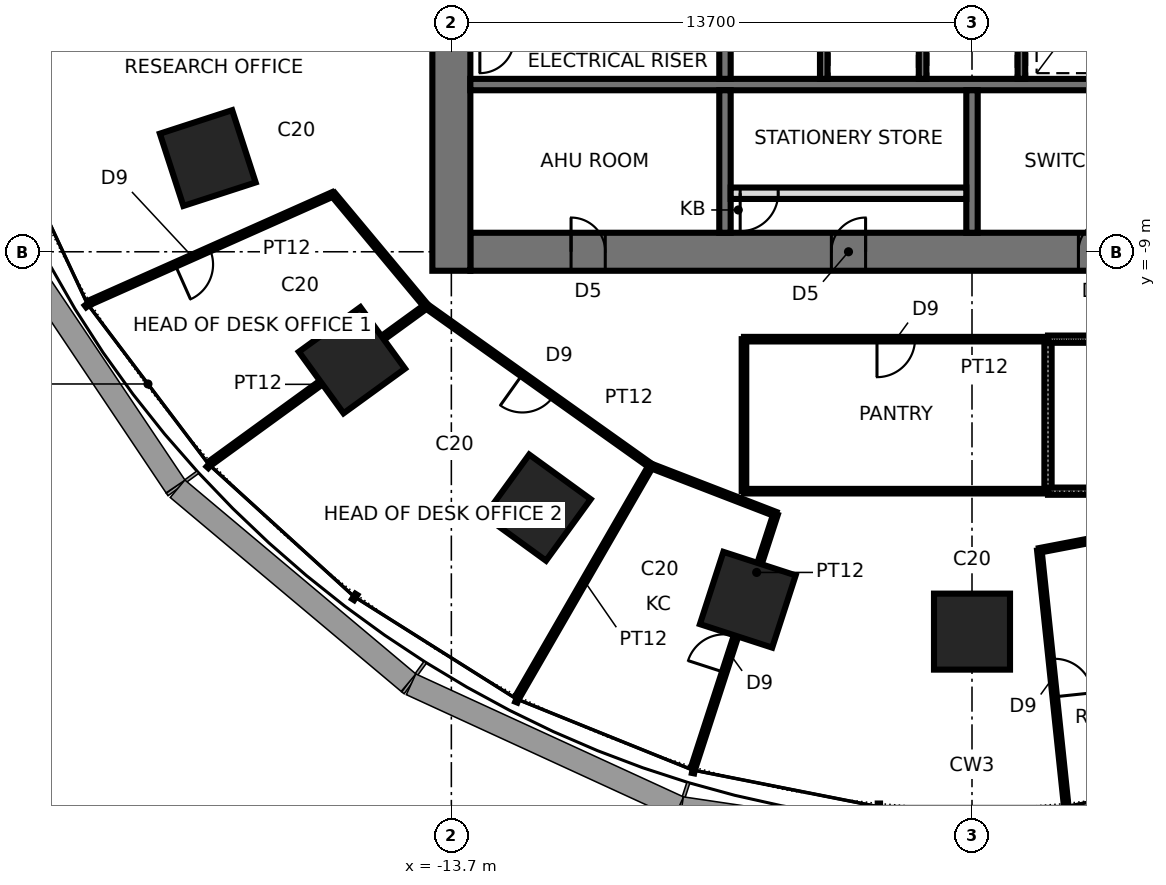
"""IFC4 building model, lengths in metres.
Left out: names, types, materials, properties, quantities, classifications, styles, units other than length and angle.
Written with IfcOpenShell. Run it as: python <this file> out.ifc"""

import sys

from ifc_helpers import new_model, si_unit, direction, frame, frame_2d, origin, origin_2d, place, context, subcontext, project, spatial, rectangle, extrude, element, fill, save


model = new_model("IFC4")
c1 = context("Model", 3, precision=1e-05, world=origin(), true_north=direction((0.0, 1.0)))
c2 = subcontext(c1, "Body", "Model", "MODEL_VIEW")
j1 = project(units=[si_unit("LENGTHUNIT", "METRE"), si_unit("PLANEANGLEUNIT", "RADIAN")], contexts=[c1])
p1 = place(None, origin())
s1 = spatial("IfcSite", under=j1, at=p1, CompositionType="ELEMENT")
p2 = place(p1, origin())
s2 = spatial("IfcBuilding", under=s1, at=p2, CompositionType="ELEMENT")
p3 = place(p2, frame((0.0, 0.0, 57.4)))
s3 = spatial("IfcBuildingStorey", under=s2, at=p3, CompositionType="ELEMENT", Elevation=57.4)
for number, where, z_axis, x_axis in (
    (1, (-20.109, -6.534, 0.0), (0.0, 0.0, 1.0), (-0.951, -0.309, 0.0)),
    (2, (-16.315, -11.854, 0.0), (0.0, 0.0, 1.0), (-0.809, -0.588, 0.0)),
    (3, (-11.43, -15.733, 0.0), (0.0, 0.0, 1.0), (-0.588, -0.809, 0.0)),
    (4, (-5.9, -18.157, 0.0), (0.0, 0.0, 1.0), (-0.309, -0.951, 0.0)),
    (5, (0.0, -18.996, 0.0), (0.0, 0.0, 1.0), (0.0, -1.0, 0.0)),
):
    element("IfcColumn", number, at=place(p3, frame(where, z_axis=z_axis, x_axis=x_axis)), inside=s3, PredefinedType="COLUMN", context=c2, shape_type="SweptSolid", body=[
        extrude(rectangle(XDim=2.0, YDim=2.0, at=origin_2d()), origin(), (0.0, 0.0, 1.0), 4.2),
    ])
p4 = place(p3, frame((-13.2, -9.0, 0.0), z_axis=(0.0, 0.0, 1.0), x_axis=(1.0, 0.0, 0.0)))
e6 = element("IfcWall", 6, at=p4, inside=s3, PredefinedType="SHEAR", context=c2, shape_type="SweptSolid", body=[
    extrude(rectangle(XDim=26.4, YDim=1.0, at=frame_2d((13.2, 0.0))), origin(), (0.0, 0.0, 1.0), 4.2),
])
p5 = place(p4, frame((2.65, 0.0, 0.0)))
e7 = element("IfcOpeningElement", 7, at=p5, cuts=e6, PredefinedType="OPENING", context=c2, shape_type="SweptSolid", body=[
    extrude(rectangle(XDim=0.9, YDim=2.1, at=frame_2d((0.45, 1.05))), frame((0.0, 0.51, 0.0), z_axis=(0.0, -1.0, 0.0), x_axis=(1.0, 0.0, 0.0)), (0.0, 0.0, 1.0), 1.02),
])
p6 = place(p4, frame((9.5, 0.0, 0.0)))
e8 = element("IfcOpeningElement", 8, at=p6, cuts=e6, PredefinedType="OPENING", context=c2, shape_type="SweptSolid", body=[
    extrude(rectangle(XDim=0.9, YDim=2.1, at=frame_2d((0.45, 1.05))), frame((0.0, 0.51, 0.0), z_axis=(0.0, -1.0, 0.0), x_axis=(1.0, 0.0, 0.0)), (0.0, 0.0, 1.0), 1.02),
])
p7 = place(p4, frame((16.0, 0.0, 0.0)))
e9 = element("IfcOpeningElement", 9, at=p7, cuts=e6, PredefinedType="OPENING", context=c2, shape_type="SweptSolid", body=[
    extrude(rectangle(XDim=0.9, YDim=2.1, at=frame_2d((0.45, 1.05))), frame((0.0, 0.51, 0.0), z_axis=(0.0, -1.0, 0.0), x_axis=(1.0, 0.0, 0.0)), (0.0, 0.0, 1.0), 1.02),
])
p8 = place(p4, frame((22.85, 0.0, 0.0)))
e10 = element("IfcOpeningElement", 10, at=p8, cuts=e6, PredefinedType="OPENING", context=c2, shape_type="SweptSolid", body=[
    extrude(rectangle(XDim=0.9, YDim=2.1, at=frame_2d((0.45, 1.05))), frame((0.0, 0.51, 0.0), z_axis=(0.0, -1.0, 0.0), x_axis=(1.0, 0.0, 0.0)), (0.0, 0.0, 1.0), 1.02),
])
p9 = place(p3, frame((-13.7, 9.5, 0.0), z_axis=(0.0, 0.0, 1.0), x_axis=(0.0, -1.0, 0.0)))
e11 = element("IfcWall", 11, at=p9, inside=s3, PredefinedType="SHEAR", context=c2, shape_type="SweptSolid", body=[
    extrude(rectangle(XDim=19.0, YDim=1.0, at=frame_2d((9.5, 0.0))), origin(), (0.0, 0.0, 1.0), 4.2),
])
p10 = place(p9, frame((8.6, 0.0, 0.0)))
e12 = element("IfcOpeningElement", 12, at=p10, cuts=e11, PredefinedType="OPENING", context=c2, shape_type="SweptSolid", body=[
    extrude(rectangle(XDim=1.8, YDim=2.4, at=frame_2d((0.9, 1.2))), frame((0.0, 0.51, 0.0), z_axis=(0.0, -1.0, 0.0), x_axis=(1.0, 0.0, 0.0)), (0.0, 0.0, 1.0), 1.02),
])
p11 = place(p3, frame((-13.2, -4.6, 0.0), z_axis=(0.0, 0.0, 1.0), x_axis=(1.0, 0.0, 0.0)))
e13 = element("IfcWall", 13, at=p11, inside=s3, PredefinedType="SHEAR", context=c2, shape_type="SweptSolid", body=[
    extrude(rectangle(XDim=26.4, YDim=0.3, at=frame_2d((13.2, 0.0))), origin(), (0.0, 0.0, 1.0), 4.2),
])
p12 = place(p3, frame((-6.5, -1.75, 0.0), z_axis=(0.0, 0.0, 1.0), x_axis=(0.0, -1.0, 0.0)))
e14 = element("IfcWall", 14, at=p12, inside=s3, PredefinedType="SHEAR", context=c2, shape_type="SweptSolid", body=[
    extrude(rectangle(XDim=2.7, YDim=0.3, at=frame_2d((1.35, 0.0))), origin(), (0.0, 0.0, 1.0), 4.2),
])
p13 = place(p3, frame((-6.5, -4.75, 0.0), z_axis=(0.0, 0.0, 1.0), x_axis=(0.0, -1.0, 0.0)))
e15 = element("IfcWall", 15, at=p13, inside=s3, PredefinedType="SHEAR", context=c2, shape_type="SweptSolid", body=[
    extrude(rectangle(XDim=3.75, YDim=0.3, at=frame_2d((1.875, 0.0))), origin(), (0.0, 0.0, 1.0), 4.2),
])
for number, where, z_axis, x_axis in (
    (16, (-3.9, -1.75, 0.0), (0.0, 0.0, 1.0), (0.0, -1.0, 0.0)),
    (17, (-1.3, -1.75, 0.0), (0.0, 0.0, 1.0), (0.0, -1.0, 0.0)),
    (18, (1.3, -1.75, 0.0), (0.0, 0.0, 1.0), (0.0, -1.0, 0.0)),
):
    element("IfcWall", number, at=place(p3, frame(where, z_axis=z_axis, x_axis=x_axis)), inside=s3, PredefinedType="SHEAR", context=c2, shape_type="SweptSolid", body=[
        extrude(rectangle(XDim=2.7, YDim=0.2, at=frame_2d((1.35, 0.0))), origin(), (0.0, 0.0, 1.0), 4.2),
    ])
p14 = place(p3, frame((0.0, -4.75, 0.0), z_axis=(0.0, 0.0, 1.0), x_axis=(0.0, -1.0, 0.0)))
e19 = element("IfcWall", 19, at=p14, inside=s3, PredefinedType="SHEAR", context=c2, shape_type="SweptSolid", body=[
    extrude(rectangle(XDim=3.75, YDim=0.3, at=frame_2d((1.875, 0.0))), origin(), (0.0, 0.0, 1.0), 4.2),
])
p15 = place(p3, frame((-6.35, -7.46, 0.0), z_axis=(0.0, 0.0, 1.0), x_axis=(1.0, 0.0, 0.0)))
e20 = element("IfcWall", 20, at=p15, inside=s3, PredefinedType="PARTITIONING", context=c2, shape_type="SweptSolid", body=[
    extrude(rectangle(XDim=6.2, YDim=0.3, at=frame_2d((3.1, 0.0))), origin(), (0.0, 0.0, 1.0), 4.04),
])
p16 = place(p15, frame((0.25, 0.0, 0.0)))
e21 = element("IfcOpeningElement", 21, at=p16, cuts=e20, PredefinedType="OPENING", context=c2, shape_type="SweptSolid", body=[
    extrude(rectangle(XDim=1.0, YDim=2.4, at=frame_2d((0.5, 1.2))), frame((0.0, 0.16, 0.0), z_axis=(0.0, -1.0, 0.0), x_axis=(1.0, 0.0, 0.0)), (0.0, 0.0, 1.0), 0.32),
])
p17 = place(p3, frame((-16.813, -7.486, 0.0), z_axis=(0.0, 0.0, 1.0), x_axis=(-0.913543837108, -0.406740282837, 0.0)))
e22 = element("IfcWall", 22, at=p17, inside=s3, PredefinedType="PARTITIONING", context=c2, shape_type="SweptSolid", body=[
    extrude(rectangle(XDim=7.0, YDim=0.12, at=frame_2d((3.5, 0.0))), origin(), (0.0, 0.0, 1.0), 4.04),
])
p18 = place(p17, frame((3.55, 0.0, 0.0)))
e23 = element("IfcOpeningElement", 23, at=p18, cuts=e22, PredefinedType="OPENING", context=c2, shape_type="SweptSolid", body=[
    extrude(rectangle(XDim=1.0, YDim=2.4, at=frame_2d((0.5, 1.2))), frame((0.0, 0.07, 0.0), z_axis=(0.0, -1.0, 0.0), x_axis=(1.0, 0.0, 0.0)), (0.0, 0.0, 1.0), 0.14),
])
p19 = place(p3, frame((-14.358, -10.431, 0.0), z_axis=(0.0, 0.0, 1.0), x_axis=(-0.640365972165, 0.768069932814, 0.0)))
e24 = element("IfcWall", 24, at=p19, inside=s3, PredefinedType="PARTITIONING", context=c2, shape_type="SweptSolid", body=[
    extrude(rectangle(XDim=3.835, YDim=0.12, at=frame_2d((1.917, 0.0))), origin(), (0.0, 0.0, 1.0), 4.04),
])
p20 = place(p3, frame((-14.358, -10.431, 0.0), z_axis=(0.0, 0.0, 1.0), x_axis=(-0.809015012105, -0.587787980643, 0.0)))
e25 = element("IfcWall", 25, at=p20, inside=s3, PredefinedType="PARTITIONING", context=c2, shape_type="SweptSolid", body=[
    extrude(rectangle(XDim=7.0, YDim=0.12, at=frame_2d((3.5, 0.0))), origin(), (0.0, 0.0, 1.0), 2.84),
])
p21 = place(p3, frame((-8.449, -14.635, 0.0), z_axis=(0.0, 0.0, 1.0), x_axis=(-0.814853539304, 0.57966689528, 0.0)))
e26 = element("IfcWall", 26, at=p21, inside=s3, PredefinedType="PARTITIONING", context=c2, shape_type="SweptSolid", body=[
    extrude(rectangle(XDim=7.251, YDim=0.12, at=frame_2d((3.625, 0.0))), origin(), (0.0, 0.0, 1.0), 4.04),
])
p22 = place(p21, frame((3.15, 0.0, 0.0)))
e27 = element("IfcOpeningElement", 27, at=p22, cuts=e26, PredefinedType="OPENING", context=c2, shape_type="SweptSolid", body=[
    extrude(rectangle(XDim=1.0, YDim=2.4, at=frame_2d((0.5, 1.2))), frame((0.0, 0.07, 0.0), z_axis=(0.0, -1.0, 0.0), x_axis=(1.0, 0.0, 0.0)), (0.0, 0.0, 1.0), 0.14),
])
p23 = place(p3, frame((-8.449, -14.635, 0.0), z_axis=(0.0, 0.0, 1.0), x_axis=(-0.499995173006, -0.866028190633, 0.0)))
e28 = element("IfcWall", 28, at=p23, inside=s3, PredefinedType="PARTITIONING", context=c2, shape_type="SweptSolid", body=[
    extrude(rectangle(XDim=7.0, YDim=0.12, at=frame_2d((3.5, 0.0))), origin(), (0.0, 0.0, 1.0), 4.04),
])
p24 = place(p3, frame((-6.0, -11.3, 0.0), z_axis=(0.0, 0.0, 1.0), x_axis=(0.0, -1.0, 0.0)))
e29 = element("IfcWall", 29, at=p24, inside=s3, PredefinedType="PARTITIONING", context=c2, shape_type="SweptSolid", body=[
    extrude(rectangle(XDim=4.0, YDim=0.12, at=frame_2d((2.0, 0.0))), origin(), (0.0, 0.0, 1.0), 4.04),
])
p25 = place(p3, frame((-5.167, -15.903, 0.0), z_axis=(0.0, 0.0, 1.0), x_axis=(-0.932804495801, 0.360382813983, 0.0)))
e30 = element("IfcWall", 30, at=p25, inside=s3, PredefinedType="PARTITIONING", context=c2, shape_type="SweptSolid", body=[
    extrude(rectangle(XDim=3.519, YDim=0.12, at=frame_2d((1.759, 0.0))), origin(), (0.0, 0.0, 1.0), 4.04),
])
p26 = place(p3, frame((-7.33, -22.56, 0.0), z_axis=(0.0, 0.0, 1.0), x_axis=(0.309009574742, 0.951058927048, 0.0)))
e31 = element("IfcWall", 31, at=p26, inside=s3, PredefinedType="PARTITIONING", context=c2, shape_type="SweptSolid", body=[
    extrude(rectangle(XDim=7.0, YDim=0.12, at=frame_2d((3.5, 0.0))), origin(), (0.0, 0.0, 1.0), 2.84),
])
p27 = place(p26, frame((2.621, 0.0, 0.0)))
e32 = element("IfcOpeningElement", 32, at=p27, cuts=e31, PredefinedType="OPENING", context=c2, shape_type="SweptSolid", body=[
    extrude(rectangle(XDim=1.0, YDim=2.4, at=frame_2d((0.5, 1.2))), frame((0.0, 0.07, 0.0), z_axis=(0.0, -1.0, 0.0), x_axis=(1.0, 0.0, 0.0)), (0.0, 0.0, 1.0), 0.14),
])
p28 = place(p3, frame((2.0, -11.3, 0.0), z_axis=(0.0, 0.0, 1.0), x_axis=(-1.0, 0.0, 0.0)))
e33 = element("IfcWall", 33, at=p28, inside=s3, PredefinedType="PARTITIONING", context=c2, shape_type="SweptSolid", body=[
    extrude(rectangle(XDim=8.0, YDim=0.12, at=frame_2d((4.0, 0.0))), origin(), (0.0, 0.0, 1.0), 4.04),
])
p29 = place(p28, frame((3.5, 0.0, 0.0)))
e34 = element("IfcOpeningElement", 34, at=p29, cuts=e33, PredefinedType="OPENING", context=c2, shape_type="SweptSolid", body=[
    extrude(rectangle(XDim=1.0, YDim=2.4, at=frame_2d((0.5, 1.2))), frame((0.0, 0.07, 0.0), z_axis=(0.0, -1.0, 0.0), x_axis=(1.0, 0.0, 0.0)), (0.0, 0.0, 1.0), 0.14),
])
p30 = place(p3, frame((-6.0, -15.3, 0.0), z_axis=(0.0, 0.0, 1.0), x_axis=(1.0, 0.0, 0.0)))
e35 = element("IfcWall", 35, at=p30, inside=s3, PredefinedType="PARTITIONING", context=c2, shape_type="SweptSolid", body=[
    extrude(rectangle(XDim=8.0, YDim=0.12, at=frame_2d((4.0, 0.0))), origin(), (0.0, 0.0, 1.0), 3.586),
])
p31 = place(p3, frame((1.772, -16.857, 0.0), z_axis=(0.0, 0.0, 1.0), x_axis=(0.104542522915, -0.994520417539, 0.0)))
e36 = element("IfcWall", 36, at=p31, inside=s3, PredefinedType="PARTITIONING", context=c2, shape_type="SweptSolid", body=[
    extrude(rectangle(XDim=6.7, YDim=0.12, at=frame_2d((3.35, 0.0))), origin(), (0.0, 0.0, 1.0), 4.04),
])
p32 = place(p31, frame((2.875, 0.0, 0.0)))
e37 = element("IfcOpeningElement", 37, at=p32, cuts=e36, PredefinedType="OPENING", context=c2, shape_type="SweptSolid", body=[
    extrude(rectangle(XDim=1.0, YDim=2.4, at=frame_2d((0.5, 1.2))), frame((0.0, 0.07, 0.0), z_axis=(0.0, -1.0, 0.0), x_axis=(1.0, 0.0, 0.0)), (0.0, 0.0, 1.0), 0.14),
])
p33 = place(p3, frame((2.0, -11.3, 0.0), z_axis=(0.0, 0.0, 1.0), x_axis=(0.0, -1.0, 0.0)))
e38 = element("IfcWall", 38, at=p33, inside=s3, PredefinedType="SOLIDWALL", context=c2, shape_type="SweptSolid", body=[
    extrude(rectangle(XDim=4.0, YDim=0.19, at=frame_2d((2.0, 0.0))), origin(), (0.0, 0.0, 1.0), 4.04),
])
p34 = place(p3, frame((5.26, -16.188, 0.0), z_axis=(0.0, 0.0, 1.0), x_axis=(-0.982089213151, -0.188416499842, 0.0)))
e39 = element("IfcWall", 39, at=p34, inside=s3, PredefinedType="PARTITIONING", context=c2, shape_type="SweptSolid", body=[
    extrude(rectangle(XDim=3.552, YDim=0.12, at=frame_2d((1.776, 0.0))), origin(), (0.0, 0.0, 1.0), 4.04),
])
p35 = place(p3, frame((2.0, -15.3, 0.0), z_axis=(0.0, 0.0, 1.0), x_axis=(1.0, 0.0, 0.0)))
e40 = element("IfcWall", 40, at=p35, inside=s3, PredefinedType="SOLIDWALL", context=c2, shape_type="SweptSolid", body=[
    extrude(rectangle(XDim=6.0, YDim=0.19, at=frame_2d((3.0, 0.0))), origin(), (0.0, 0.0, 1.0), 3.586),
])
p36 = place(p3, frame((8.0, -11.3, 0.0), z_axis=(0.0, 0.0, 1.0), x_axis=(-1.0, 0.0, 0.0)))
e41 = element("IfcWall", 41, at=p36, inside=s3, PredefinedType="SOLIDWALL", context=c2, shape_type="SweptSolid", body=[
    extrude(rectangle(XDim=6.0, YDim=0.19, at=frame_2d((3.0, 0.0))), origin(), (0.0, 0.0, 1.0), 4.04),
])
p37 = place(p36, frame((2.4, 0.0, 0.0)))
e42 = element("IfcOpeningElement", 42, at=p37, cuts=e41, PredefinedType="OPENING", context=c2, shape_type="SweptSolid", body=[
    extrude(rectangle(XDim=1.2, YDim=2.1, at=frame_2d((0.6, 1.05))), frame((0.0, 0.105, 0.0), z_axis=(0.0, -1.0, 0.0), x_axis=(1.0, 0.0, 0.0)), (0.0, 0.0, 1.0), 0.21),
])
p38 = place(p5, origin())
e43 = element("IfcDoor", 43, at=p38, inside=s3, OperationType="SINGLE_SWING_LEFT", PredefinedType="DOOR", context=c2, shape_type="SweptSolid", body=[
    extrude(rectangle(XDim=0.82, YDim=2.06, at=frame_2d((0.45, 1.03))), frame((0.0, 0.025, 0.0), z_axis=(0.0, -1.0, 0.0), x_axis=(1.0, 0.0, 0.0)), (0.0, 0.0, 1.0), 0.05),
    extrude(rectangle(XDim=0.04, YDim=2.1, at=frame_2d((0.02, 1.05))), frame((0.0, 0.25, 0.0), z_axis=(0.0, -1.0, 0.0), x_axis=(1.0, 0.0, 0.0)), (0.0, 0.0, 1.0), 0.5),
    extrude(rectangle(XDim=0.04, YDim=2.1, at=frame_2d((0.88, 1.05))), frame((0.0, 0.25, 0.0), z_axis=(0.0, -1.0, 0.0), x_axis=(1.0, 0.0, 0.0)), (0.0, 0.0, 1.0), 0.5),
    extrude(rectangle(XDim=0.82, YDim=0.04, at=frame_2d((0.45, 2.08))), frame((0.0, 0.25, 0.0), z_axis=(0.0, -1.0, 0.0), x_axis=(1.0, 0.0, 0.0)), (0.0, 0.0, 1.0), 0.5),
])
fill(e7, e43)
p39 = place(p6, origin())
e44 = element("IfcDoor", 44, at=p39, inside=s3, OperationType="SINGLE_SWING_RIGHT", PredefinedType="DOOR", context=c2, shape_type="SweptSolid", body=[
    extrude(rectangle(XDim=0.82, YDim=2.06, at=frame_2d((0.45, 1.03))), frame((0.0, 0.025, 0.0), z_axis=(0.0, -1.0, 0.0), x_axis=(1.0, 0.0, 0.0)), (0.0, 0.0, 1.0), 0.05),
    extrude(rectangle(XDim=0.04, YDim=2.1, at=frame_2d((0.02, 1.05))), frame((0.0, 0.25, 0.0), z_axis=(0.0, -1.0, 0.0), x_axis=(1.0, 0.0, 0.0)), (0.0, 0.0, 1.0), 0.5),
    extrude(rectangle(XDim=0.04, YDim=2.1, at=frame_2d((0.88, 1.05))), frame((0.0, 0.25, 0.0), z_axis=(0.0, -1.0, 0.0), x_axis=(1.0, 0.0, 0.0)), (0.0, 0.0, 1.0), 0.5),
    extrude(rectangle(XDim=0.82, YDim=0.04, at=frame_2d((0.45, 2.08))), frame((0.0, 0.25, 0.0), z_axis=(0.0, -1.0, 0.0), x_axis=(1.0, 0.0, 0.0)), (0.0, 0.0, 1.0), 0.5),
])
fill(e8, e44)
p40 = place(p7, origin())
e45 = element("IfcDoor", 45, at=p40, inside=s3, OperationType="SINGLE_SWING_RIGHT", PredefinedType="DOOR", context=c2, shape_type="SweptSolid", body=[
    extrude(rectangle(XDim=0.82, YDim=2.06, at=frame_2d((0.45, 1.03))), frame((0.0, 0.025, 0.0), z_axis=(0.0, -1.0, 0.0), x_axis=(1.0, 0.0, 0.0)), (0.0, 0.0, 1.0), 0.05),
    extrude(rectangle(XDim=0.04, YDim=2.1, at=frame_2d((0.02, 1.05))), frame((0.0, 0.25, 0.0), z_axis=(0.0, -1.0, 0.0), x_axis=(1.0, 0.0, 0.0)), (0.0, 0.0, 1.0), 0.5),
    extrude(rectangle(XDim=0.04, YDim=2.1, at=frame_2d((0.88, 1.05))), frame((0.0, 0.25, 0.0), z_axis=(0.0, -1.0, 0.0), x_axis=(1.0, 0.0, 0.0)), (0.0, 0.0, 1.0), 0.5),
    extrude(rectangle(XDim=0.82, YDim=0.04, at=frame_2d((0.45, 2.08))), frame((0.0, 0.25, 0.0), z_axis=(0.0, -1.0, 0.0), x_axis=(1.0, 0.0, 0.0)), (0.0, 0.0, 1.0), 0.5),
])
fill(e9, e45)
p41 = place(p16, frame((1.0, 0.0, 0.0), z_axis=(0.0, 0.0, 1.0), x_axis=(-1.0, 0.0, 0.0)))
e46 = element("IfcDoor", 46, at=p41, inside=s3, OperationType="SINGLE_SWING_RIGHT", PredefinedType="DOOR", context=c2, shape_type="SweptSolid", body=[
    extrude(rectangle(XDim=1.0, YDim=2.4, at=frame_2d((0.5, 1.2))), frame((0.0, 0.025, 0.0), z_axis=(0.0, -1.0, 0.0), x_axis=(1.0, 0.0, 0.0)), (0.0, 0.0, 1.0), 0.05),
])
fill(e21, e46)
p42 = place(p18, origin())
e47 = element("IfcDoor", 47, at=p42, inside=s3, OperationType="SINGLE_SWING_RIGHT", PredefinedType="DOOR", context=c2, shape_type="SweptSolid", body=[
    extrude(rectangle(XDim=1.0, YDim=2.4, at=frame_2d((0.5, 1.2))), frame((0.0, 0.025, 0.0), z_axis=(0.0, -1.0, 0.0), x_axis=(1.0, 0.0, 0.0)), (0.0, 0.0, 1.0), 0.05),
])
fill(e23, e47)
p43 = place(p22, origin())
e48 = element("IfcDoor", 48, at=p43, inside=s3, OperationType="SINGLE_SWING_RIGHT", PredefinedType="DOOR", context=c2, shape_type="SweptSolid", body=[
    extrude(rectangle(XDim=1.0, YDim=2.4, at=frame_2d((0.5, 1.2))), frame((0.0, 0.025, 0.0), z_axis=(0.0, -1.0, 0.0), x_axis=(1.0, 0.0, 0.0)), (0.0, 0.0, 1.0), 0.05),
])
fill(e27, e48)
p44 = place(p27, origin())
e49 = element("IfcDoor", 49, at=p44, inside=s3, OperationType="SINGLE_SWING_LEFT", PredefinedType="DOOR", context=c2, shape_type="SweptSolid", body=[
    extrude(rectangle(XDim=1.0, YDim=2.4, at=frame_2d((0.5, 1.2))), frame((0.0, 0.025, 0.0), z_axis=(0.0, -1.0, 0.0), x_axis=(1.0, 0.0, 0.0)), (0.0, 0.0, 1.0), 0.05),
])
fill(e32, e49)
p45 = place(p32, origin())
e50 = element("IfcDoor", 50, at=p45, inside=s3, OperationType="SINGLE_SWING_RIGHT", PredefinedType="DOOR", context=c2, shape_type="SweptSolid", body=[
    extrude(rectangle(XDim=1.0, YDim=2.4, at=frame_2d((0.5, 1.2))), frame((0.0, 0.025, 0.0), z_axis=(0.0, -1.0, 0.0), x_axis=(1.0, 0.0, 0.0)), (0.0, 0.0, 1.0), 0.05),
])
fill(e37, e50)
p46 = place(p29, origin())
e51 = element("IfcDoor", 51, at=p46, inside=s3, OperationType="SINGLE_SWING_RIGHT", PredefinedType="DOOR", context=c2, shape_type="SweptSolid", body=[
    extrude(rectangle(XDim=1.0, YDim=2.4, at=frame_2d((0.5, 1.2))), frame((0.0, 0.025, 0.0), z_axis=(0.0, -1.0, 0.0), x_axis=(1.0, 0.0, 0.0)), (0.0, 0.0, 1.0), 0.05),
])
fill(e34, e51)
save(model, sys.argv[1])
